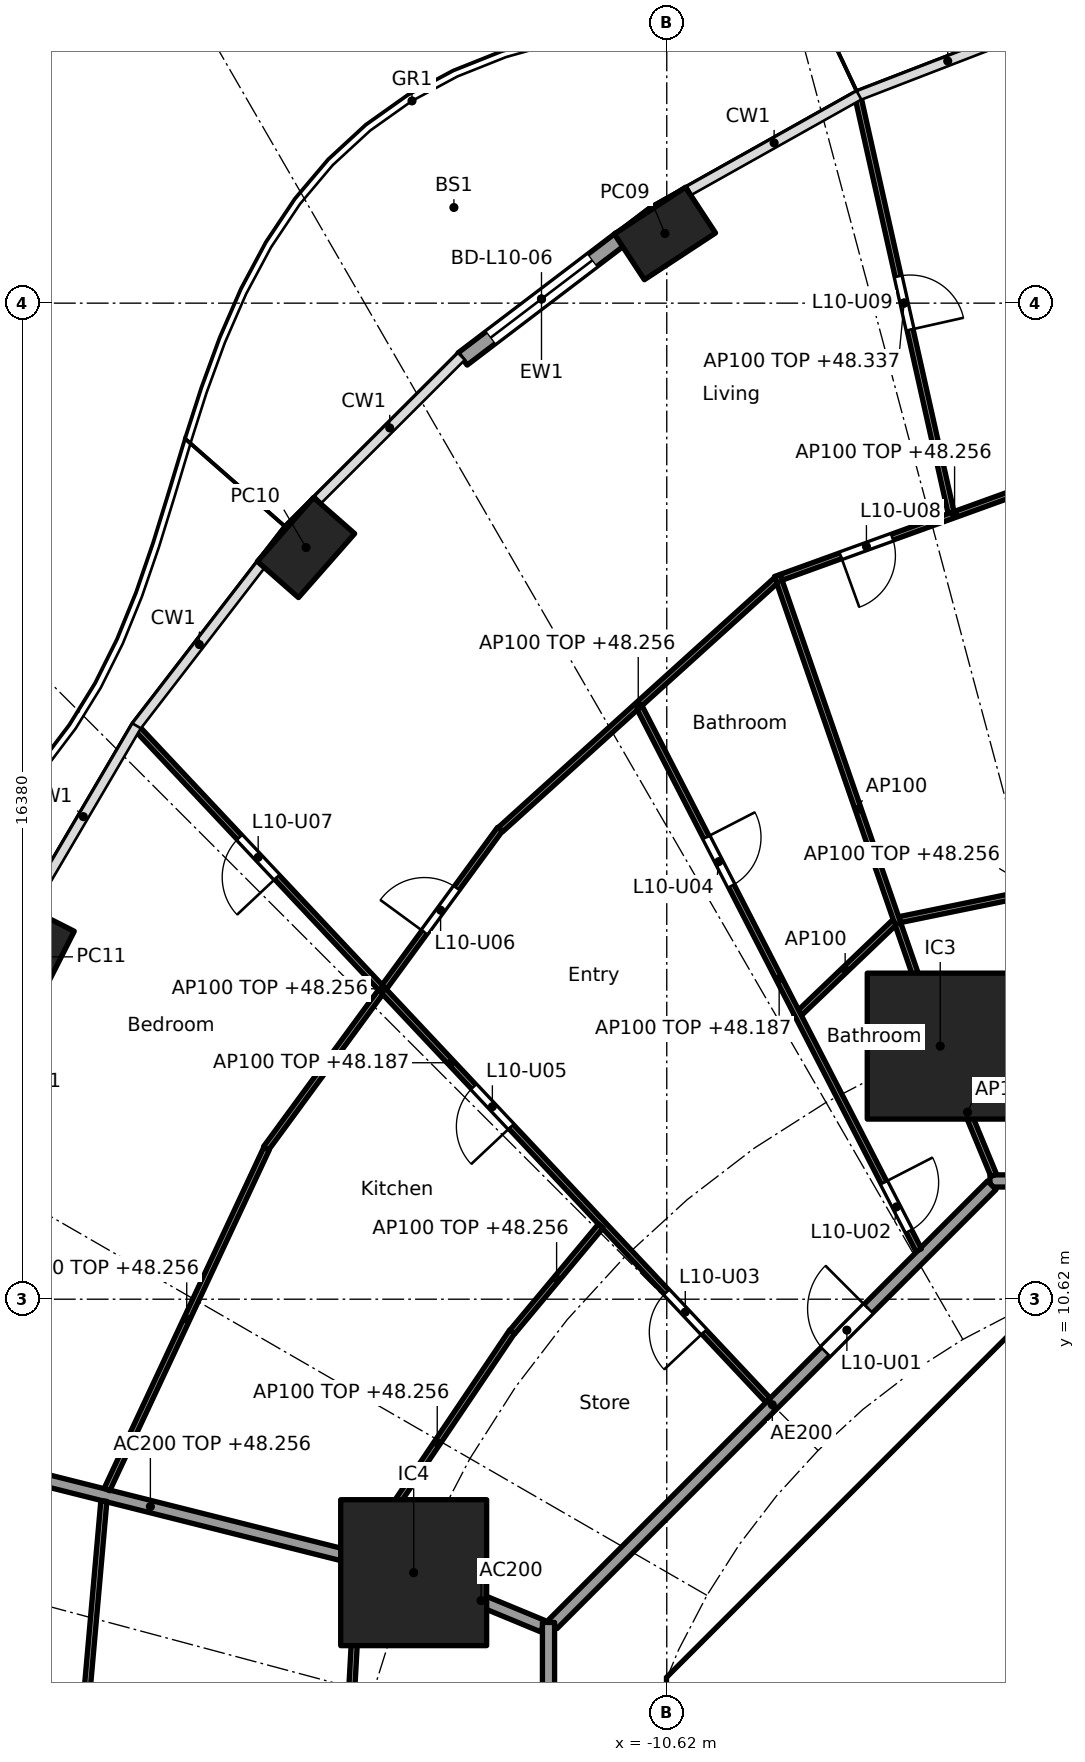
"""IFC4 building model, lengths in metres.
Left out: names, types, materials, properties, quantities, classifications, styles, units other than length and angle.
Written with IfcOpenShell. Run it as: python <this file> out.ifc"""

import sys

from ifc_helpers import new_model, si_unit, direction, frame, frame_2d, origin, origin_2d, place, context, subcontext, project, spatial, polyline, rectangle, hollow_rectangle, outline, extrude, element, fill, save


model = new_model("IFC4")
c1 = context("Model", 3, precision=1e-05, world=origin(), true_north=direction((0.0, 1.0)))
c2 = subcontext(c1, "Body", "Model", "MODEL_VIEW")
j1 = project(units=[si_unit("LENGTHUNIT", "METRE"), si_unit("PLANEANGLEUNIT", "RADIAN")], contexts=[c1])
p1 = place(None, origin())
s1 = spatial("IfcSite", under=j1, at=p1, CompositionType="ELEMENT")
p2 = place(p1, origin())
s2 = spatial("IfcBuilding", under=s1, at=p2, CompositionType="ELEMENT")
p3 = place(p2, frame((0.0, 0.0, 45.5)))
s3 = spatial("IfcBuildingStorey", under=s2, at=p3, CompositionType="ELEMENT", Elevation=45.5)
for number, where, z_axis, x_axis in (
    (1, (-10.65, 28.146, 0.0), (0.0, 0.0, 1.0), (-0.836, -0.549, 0.0)),
    (2, (-16.552, 22.981, 0.0), (0.0, 0.0, 1.0), (-0.66, -0.751, 0.0)),
    (3, (-21.082, 16.25, 0.0), (0.0, 0.0, 1.0), (-0.452, -0.892, 0.0)),
):
    element("IfcColumn", number, at=place(p3, frame(where, z_axis=z_axis, x_axis=x_axis)), inside=s3, PredefinedType="COLUMN", context=c2, shape_type="SweptSolid", body=[
        extrude(hollow_rectangle(XDim=1.4, YDim=0.9, WallThickness=0.05, at=origin_2d()), origin(), (0.0, 0.0, 1.0), 3.7),
    ])
for number, where, z_axis, x_axis in (
    (4, (-6.123, 14.782, 0.0), (0.0, 0.0, 1.0), (1.0, 0.0, 0.0)),
    (5, (-14.782, 6.123, 0.0), (0.0, 0.0, 1.0), (1.0, 0.0, 0.0)),
):
    element("IfcColumn", number, at=place(p3, frame(where, z_axis=z_axis, x_axis=x_axis)), inside=s3, PredefinedType="COLUMN", context=c2, shape_type="SweptSolid", body=[
        extrude(rectangle(XDim=2.4, YDim=2.4, at=origin_2d()), origin(), (0.0, 0.0, 1.0), 3.7),
    ])
p4 = place(p3, frame((-13.979, 26.081, 0.0), z_axis=(0.0, 0.0, 1.0), x_axis=(0.796022293214, 0.605267303517, 0.0)))
e6 = element("IfcWall", 6, at=p4, inside=s3, PredefinedType="SOLIDWALL", context=c2, shape_type="SweptSolid", body=[
    extrude(rectangle(XDim=3.262, YDim=0.25, at=frame_2d((1.631, 0.0))), origin(), (0.0, 0.0, 1.0), 3.44),
])
p5 = place(p4, frame((0.581, 0.0, 0.0)))
e7 = element("IfcOpeningElement", 7, at=p5, cuts=e6, PredefinedType="OPENING", context=c2, shape_type="SweptSolid", body=[
    extrude(rectangle(XDim=2.1, YDim=2.4, at=frame_2d((1.05, 1.2))), frame((0.0, 0.135, 0.0), z_axis=(0.0, -1.0, 0.0), x_axis=(1.0, 0.0, 0.0)), (0.0, 0.0, 1.0), 0.27),
])
p6 = place(p3, frame((-4.613, 9.988, 0.0), z_axis=(0.0, 0.0, 1.0), x_axis=(-0.707106781187, -0.707106781187, 0.0)))
e8 = element("IfcWall", 8, at=p6, inside=s3, PredefinedType="SHEAR", context=c2, shape_type="SweptSolid", body=[
    extrude(rectangle(XDim=7.602, YDim=0.6, at=frame_2d((3.801, 0.0))), origin(), (0.0, 0.0, 1.0), 3.44),
])
p7 = place(p6, frame((0.351, 0.0, 0.0)))
e9 = element("IfcOpeningElement", 9, at=p7, cuts=e8, PredefinedType="OPENING", context=c2, shape_type="SweptSolid", body=[
    extrude(rectangle(XDim=1.1, YDim=2.1, at=frame_2d((0.55, 1.05))), frame((0.0, 0.31, 0.0), z_axis=(0.0, -1.0, 0.0), x_axis=(1.0, 0.0, 0.0)), (0.0, 0.0, 1.0), 0.62),
])
p8 = place(p3, frame((-5.8, 4.3, 0.0), z_axis=(0.0, 0.0, 1.0), x_axis=(0.0, 1.0, 0.0)))
e10 = element("IfcWall", 10, at=p8, inside=s3, PredefinedType="PARTITIONING", context=c2, shape_type="SweptSolid", body=[
    extrude(rectangle(XDim=3.927, YDim=0.15, at=frame_2d((1.963, 0.0))), origin(), (0.0, 0.0, 1.0), 3.44),
])
p9 = place(p8, frame((1.551, 0.0, 0.0)))
e11 = element("IfcOpeningElement", 11, at=p9, cuts=e10, PredefinedType="OPENING", context=c2, shape_type="SweptSolid", body=[
    extrude(rectangle(XDim=0.9, YDim=2.1, at=frame_2d((0.45, 1.05))), frame((0.0, 0.085, 0.0), z_axis=(0.0, -1.0, 0.0), x_axis=(1.0, 0.0, 0.0)), (0.0, 0.0, 1.0), 0.17),
])
p10 = place(p3, origin())
e12 = element("IfcWall", 12, at=p10, inside=s3, PredefinedType="SHEAR", context=c2, shape_type="SweptSolid", body=[
    extrude(outline(polyline([(-10.2, 4.825), (-9.776, 4.401), (-10.025, 4.152), (-10.025, 3.801), (-10.625, 3.801), (-10.625, 4.401), (-10.2, 4.825)])), origin(), (0.0, 0.0, 1.0), 3.44),
])
p11 = place(p3, frame((-12.657, 5.243, 0.0), z_axis=(0.0, 0.0, 1.0), x_axis=(-0.923885664896, 0.382668627144, 0.0)))
e13 = element("IfcWall", 13, at=p11, inside=s3, PredefinedType="PARTITIONING", context=c2, shape_type="SweptSolid", body=[
    extrude(rectangle(XDim=2.2, YDim=0.2, at=frame_2d((1.1, 0.0))), origin(), (0.0, 0.0, 1.0), 3.44),
])
p12 = place(p3, frame((-14.831, 6.135, 0.0), z_axis=(0.0, 0.0, 1.0), x_axis=(-0.969884949569, 0.243563512454, 0.0)))
e14 = element("IfcWall", 14, at=p12, inside=s3, PredefinedType="PARTITIONING", context=c2, shape_type="SweptSolid", body=[
    extrude(rectangle(XDim=8.829, YDim=0.2, at=frame_2d((4.415, 0.0))), origin(), (0.0, 0.0, 1.0), 2.756),
])
p13 = place(p3, frame((5.104, 12.565, 0.0), z_axis=(0.0, 0.0, 1.0), x_axis=(-1.0, 0.0, 0.0)))
e15 = element("IfcWall", 15, at=p13, inside=s3, PredefinedType="PARTITIONING", context=c2, shape_type="SweptSolid", body=[
    extrude(rectangle(XDim=10.409, YDim=0.2, at=frame_2d((5.205, 0.0))), origin(), (0.0, 0.0, 1.0), 3.44),
])
p14 = place(p3, frame((-5.275, 12.494, 0.0), z_axis=(0.0, 0.0, 1.0), x_axis=(-0.707106781187, -0.707106781187, 0.0)))
e16 = element("IfcWall", 16, at=p14, inside=s3, PredefinedType="PARTITIONING", context=c2, shape_type="SweptSolid", body=[
    extrude(rectangle(XDim=10.209, YDim=0.2, at=frame_2d((5.104, 0.0))), origin(), (0.0, 0.0, 1.0), 3.44),
])
p15 = place(p14, frame((2.87, 0.0, 0.0)))
e17 = element("IfcOpeningElement", 17, at=p15, cuts=e16, PredefinedType="OPENING", context=c2, shape_type="SweptSolid", body=[
    extrude(rectangle(XDim=1.0, YDim=2.1, at=frame_2d((0.5, 1.05))), frame((0.0, 0.11, 0.0), z_axis=(0.0, -1.0, 0.0), x_axis=(1.0, 0.0, 0.0)), (0.0, 0.0, 1.0), 0.22),
])
p16 = place(p3, frame((-12.565, 5.304, 0.0), z_axis=(0.0, 0.0, 1.0), x_axis=(0.0, -1.0, 0.0)))
e18 = element("IfcWall", 18, at=p16, inside=s3, PredefinedType="PARTITIONING", context=c2, shape_type="SweptSolid", body=[
    extrude(rectangle(XDim=10.409, YDim=0.2, at=frame_2d((5.205, 0.0))), origin(), (0.0, 0.0, 1.0), 3.44),
])
p17 = place(p3, frame((-2.272, 17.789, 0.0), z_axis=(0.0, 0.0, 1.0), x_axis=(-0.979587203416, -0.2010196779, 0.0)))
e19 = element("IfcWall", 19, at=p17, inside=s3, PredefinedType="PARTITIONING", context=c2, shape_type="SweptSolid", body=[
    extrude(rectangle(XDim=4.613, YDim=0.1, at=frame_2d((2.306, 0.0))), origin(), (0.0, 0.0, 1.0), 2.756),
])
p18 = place(p17, frame((1.881, 0.0, 0.0)))
e20 = element("IfcOpeningElement", 20, at=p18, cuts=e19, PredefinedType="OPENING", context=c2, shape_type="SweptSolid", body=[
    extrude(rectangle(XDim=0.9, YDim=2.1, at=frame_2d((0.45, 1.05))), frame((0.0, 0.06, 0.0), z_axis=(0.0, -1.0, 0.0), x_axis=(1.0, 0.0, 0.0)), (0.0, 0.0, 1.0), 0.12),
])
p19 = place(p3, frame((-3.034, 24.554, 0.0), z_axis=(0.0, 0.0, 1.0), x_axis=(-0.940401691072, -0.340065669288, 0.0)))
e21 = element("IfcWall", 21, at=p19, inside=s3, PredefinedType="PARTITIONING", context=c2, shape_type="SweptSolid", body=[
    extrude(rectangle(XDim=6.067, YDim=0.1, at=frame_2d((3.034, 0.0))), origin(), (0.0, 0.0, 1.0), 2.756),
])
p20 = place(p19, frame((4.125, 0.0, 0.0)))
e22 = element("IfcOpeningElement", 22, at=p20, cuts=e21, PredefinedType="OPENING", context=c2, shape_type="SweptSolid", body=[
    extrude(rectangle(XDim=0.9, YDim=2.1, at=frame_2d((0.45, 1.05))), frame((0.0, 0.06, 0.0), z_axis=(0.0, -1.0, 0.0), x_axis=(1.0, 0.0, 0.0)), (0.0, 0.0, 1.0), 0.12),
])
p21 = place(p3, frame((-5.945, 23.555, 0.0), z_axis=(0.0, 0.0, 1.0), x_axis=(-0.218598565433, 0.975814873421, 0.0)))
e23 = element("IfcWall", 23, at=p21, inside=s3, PredefinedType="PARTITIONING", context=c2, shape_type="SweptSolid", body=[
    extrude(rectangle(XDim=7.065, YDim=0.1, at=frame_2d((3.533, 0.0))), origin(), (0.0, 0.0, 1.0), 2.837),
])
p22 = place(p21, frame((3.083, 0.0, 0.0)))
e24 = element("IfcOpeningElement", 24, at=p22, cuts=e23, PredefinedType="OPENING", context=c2, shape_type="SweptSolid", body=[
    extrude(rectangle(XDim=0.9, YDim=2.1, at=frame_2d((0.45, 1.05))), frame((0.0, 0.06, 0.0), z_axis=(0.0, -1.0, 0.0), x_axis=(1.0, 0.0, 0.0)), (0.0, 0.0, 1.0), 0.12),
])
p23 = place(p3, frame((-5.243, 12.657, 0.0), z_axis=(0.0, 0.0, 1.0), x_axis=(-0.382719158442, 0.923864733477, 0.0)))
e25 = element("IfcWall", 25, at=p23, inside=s3, PredefinedType="PARTITIONING", context=c2, shape_type="SweptSolid", body=[
    extrude(rectangle(XDim=2.25, YDim=0.1, at=frame_2d((1.125, 0.0))), origin(), (0.0, 0.0, 1.0), 3.44),
])
p24 = place(p3, frame((-6.139, 14.829, 0.0), z_axis=(0.0, 0.0, 1.0), x_axis=(-0.327183700812, 0.944960753642, 0.0)))
e26 = element("IfcWall", 26, at=p24, inside=s3, PredefinedType="PARTITIONING", context=c2, shape_type="SweptSolid", body=[
    extrude(rectangle(XDim=8.14, YDim=0.1, at=frame_2d((4.07, 0.0))), origin(), (0.0, 0.0, 1.0), 3.44),
])
p25 = place(p3, frame((-6.876, 16.817, 0.0), z_axis=(0.0, 0.0, 1.0), x_axis=(-0.722762371977, -0.691096631199, 0.0)))
e27 = element("IfcWall", 27, at=p25, inside=s3, PredefinedType="PARTITIONING", context=c2, shape_type="SweptSolid", body=[
    extrude(rectangle(XDim=2.244, YDim=0.1, at=frame_2d((1.122, 0.0))), origin(), (0.0, 0.0, 1.0), 3.44),
])
p26 = place(p3, frame((-8.823, 22.441, 0.0), z_axis=(0.0, 0.0, 1.0), x_axis=(-0.741722263338, -0.670707152242, 0.0)))
e28 = element("IfcWall", 28, at=p26, inside=s3, PredefinedType="PARTITIONING", context=c2, shape_type="SweptSolid", body=[
    extrude(rectangle(XDim=6.109, YDim=0.1, at=frame_2d((3.055, 0.0))), origin(), (0.0, 0.0, 1.0), 2.756),
])
p27 = place(p3, frame((-6.477, 11.427, 0.0), z_axis=(0.0, 0.0, 1.0), x_axis=(-0.457464037982, 0.889228122561, 0.0)))
e29 = element("IfcWall", 29, at=p27, inside=s3, PredefinedType="PARTITIONING", context=c2, shape_type="SweptSolid", body=[
    extrude(rectangle(XDim=10.032, YDim=0.1, at=frame_2d((5.016, 0.0))), origin(), (0.0, 0.0, 1.0), 2.687),
])
p28 = place(p27, frame((0.35, 0.0, 0.0)))
e30 = element("IfcOpeningElement", 30, at=p28, cuts=e29, PredefinedType="OPENING", context=c2, shape_type="SweptSolid", body=[
    extrude(rectangle(XDim=0.9, YDim=2.1, at=frame_2d((0.45, 1.05))), frame((0.0, 0.06, 0.0), z_axis=(0.0, -1.0, 0.0), x_axis=(1.0, 0.0, 0.0)), (0.0, 0.0, 1.0), 0.12),
])
p29 = place(p27, frame((6.735, 0.0, 0.0)))
e31 = element("IfcOpeningElement", 31, at=p29, cuts=e29, PredefinedType="OPENING", context=c2, shape_type="SweptSolid", body=[
    extrude(rectangle(XDim=0.9, YDim=2.1, at=frame_2d((0.45, 1.05))), frame((0.0, 0.06, 0.0), z_axis=(0.0, -1.0, 0.0), x_axis=(1.0, 0.0, 0.0)), (0.0, 0.0, 1.0), 0.12),
])
p30 = place(p3, frame((-13.362, 18.35, 0.0), z_axis=(0.0, 0.0, 1.0), x_axis=(-0.591191311491, -0.806531359104, 0.0)))
e32 = element("IfcWall", 32, at=p30, inside=s3, PredefinedType="PARTITIONING", context=c2, shape_type="SweptSolid", body=[
    extrude(rectangle(XDim=6.51, YDim=0.1, at=frame_2d((3.255, 0.0))), origin(), (0.0, 0.0, 1.0), 2.756),
])
p31 = place(p30, frame((1.202, 0.0, 0.0)))
e33 = element("IfcOpeningElement", 33, at=p31, cuts=e32, PredefinedType="OPENING", context=c2, shape_type="SweptSolid", body=[
    extrude(rectangle(XDim=0.9, YDim=2.1, at=frame_2d((0.45, 1.05))), frame((0.0, 0.06, 0.0), z_axis=(0.0, -1.0, 0.0), x_axis=(1.0, 0.0, 0.0)), (0.0, 0.0, 1.0), 0.12),
])
p32 = place(p3, frame((-8.953, 8.958, 0.0), z_axis=(0.0, 0.0, 1.0), x_axis=(-0.684574307023, 0.728943082939, 0.0)))
e34 = element("IfcWall", 34, at=p32, inside=s3, PredefinedType="PARTITIONING", context=c2, shape_type="SweptSolid", body=[
    extrude(rectangle(XDim=15.231, YDim=0.1, at=frame_2d((7.615, 0.0))), origin(), (0.0, 0.0, 1.0), 2.687),
])
p33 = place(p32, frame((1.54, 0.0, 0.0)))
e35 = element("IfcOpeningElement", 35, at=p33, cuts=e34, PredefinedType="OPENING", context=c2, shape_type="SweptSolid", body=[
    extrude(rectangle(XDim=0.9, YDim=2.1, at=frame_2d((0.45, 1.05))), frame((0.0, 0.06, 0.0), z_axis=(0.0, -1.0, 0.0), x_axis=(1.0, 0.0, 0.0)), (0.0, 0.0, 1.0), 0.12),
])
p34 = place(p32, frame((6.174, 0.0, 0.0)))
e36 = element("IfcOpeningElement", 36, at=p34, cuts=e34, PredefinedType="OPENING", context=c2, shape_type="SweptSolid", body=[
    extrude(rectangle(XDim=0.9, YDim=2.1, at=frame_2d((0.45, 1.05))), frame((0.0, 0.06, 0.0), z_axis=(0.0, -1.0, 0.0), x_axis=(1.0, 0.0, 0.0)), (0.0, 0.0, 1.0), 0.12),
])
p35 = place(p32, frame((11.8, 0.0, 0.0)))
e37 = element("IfcOpeningElement", 37, at=p35, cuts=e34, PredefinedType="OPENING", context=c2, shape_type="SweptSolid", body=[
    extrude(rectangle(XDim=0.9, YDim=2.1, at=frame_2d((0.45, 1.05))), frame((0.0, 0.06, 0.0), z_axis=(0.0, -1.0, 0.0), x_axis=(1.0, 0.0, 0.0)), (0.0, 0.0, 1.0), 0.12),
])
p36 = place(p3, frame((-11.705, 11.825, 0.0), z_axis=(0.0, 0.0, 1.0), x_axis=(-0.640861724905, -0.767656335577, 0.0)))
e38 = element("IfcWall", 38, at=p36, inside=s3, PredefinedType="PARTITIONING", context=c2, shape_type="SweptSolid", body=[
    extrude(rectangle(XDim=2.268, YDim=0.1, at=frame_2d((1.134, 0.0))), origin(), (0.0, 0.0, 1.0), 2.756),
])
p37 = place(p3, frame((-13.162, 10.087, 0.0), z_axis=(0.0, 0.0, 1.0), x_axis=(-0.55912750241, -0.829081682375, 0.0)))
e39 = element("IfcWall", 39, at=p37, inside=s3, PredefinedType="PARTITIONING", context=c2, shape_type="SweptSolid", body=[
    extrude(rectangle(XDim=4.408, YDim=0.1, at=frame_2d((2.204, 0.0))), origin(), (0.0, 0.0, 1.0), 2.756),
])
p38 = place(p3, frame((-17.203, 13.095, 0.0), z_axis=(0.0, 0.0, 1.0), x_axis=(-0.423926333401, -0.905696673202, 0.0)))
e40 = element("IfcWall", 40, at=p38, inside=s3, PredefinedType="PARTITIONING", context=c2, shape_type="SweptSolid", body=[
    extrude(rectangle(XDim=6.188, YDim=0.1, at=frame_2d((3.094, 0.0))), origin(), (0.0, 0.0, 1.0), 2.756),
])
p39 = place(p3, frame((-15.688, 6.249, 0.0), z_axis=(0.0, 0.0, 1.0), x_axis=(-0.054659814056, -0.998505034903, 0.0)))
e41 = element("IfcWall", 41, at=p39, inside=s3, PredefinedType="PARTITIONING", context=c2, shape_type="SweptSolid", body=[
    extrude(rectangle(XDim=6.208, YDim=0.1, at=frame_2d((3.104, 0.0))), origin(), (0.0, 0.0, 1.0), 2.756),
])
p40 = place(p3, frame((-19.877, 7.301, 0.0), z_axis=(0.0, 0.0, 1.0), x_axis=(-0.088143415068, -0.996107794558, 0.0)))
e42 = element("IfcWall", 42, at=p40, inside=s3, PredefinedType="PARTITIONING", context=c2, shape_type="SweptSolid", body=[
    extrude(rectangle(XDim=7.279, YDim=0.1, at=frame_2d((3.64, 0.0))), origin(), (0.0, 0.0, 1.0), 2.756),
])
p41 = place(p5, origin())
e43 = element("IfcDoor", 43, at=p41, inside=s3, OperationType="SLIDING_TO_LEFT", PredefinedType="DOOR", context=c2, shape_type="SweptSolid", body=[
    extrude(rectangle(XDim=2.1, YDim=2.4, at=frame_2d((1.05, 1.2))), frame((0.0, 0.025, 0.0), z_axis=(0.0, -1.0, 0.0), x_axis=(1.0, 0.0, 0.0)), (0.0, 0.0, 1.0), 0.05),
])
fill(e7, e43)
p42 = place(p9, origin())
e44 = element("IfcDoor", 44, at=p42, inside=s3, OperationType="SINGLE_SWING_RIGHT", PredefinedType="DOOR", context=c2, shape_type="SweptSolid", body=[
    extrude(rectangle(XDim=0.9, YDim=2.1, at=frame_2d((0.45, 1.05))), frame((0.0, 0.025, 0.0), z_axis=(0.0, -1.0, 0.0), x_axis=(1.0, 0.0, 0.0)), (0.0, 0.0, 1.0), 0.05),
])
fill(e11, e44)
p43 = place(p7, origin())
e45 = element("IfcDoor", 45, at=p43, inside=s3, OperationType="SINGLE_SWING_RIGHT", PredefinedType="DOOR", context=c2, shape_type="SweptSolid", body=[
    extrude(rectangle(XDim=1.1, YDim=2.1, at=frame_2d((0.55, 1.05))), frame((0.0, 0.025, 0.0), z_axis=(0.0, -1.0, 0.0), x_axis=(1.0, 0.0, 0.0)), (0.0, 0.0, 1.0), 0.05),
])
fill(e9, e45)
p44 = place(p15, frame((1.0, 0.0, 0.0), x_axis=(-1.0, 0.0, 0.0)))
e46 = element("IfcDoor", 46, at=p44, inside=s3, OperationType="SINGLE_SWING_RIGHT", PredefinedType="DOOR", context=c2, shape_type="SweptSolid", body=[
    extrude(rectangle(XDim=1.0, YDim=2.1, at=frame_2d((0.5, 1.05))), frame((0.0, 0.025, 0.0), z_axis=(0.0, -1.0, 0.0), x_axis=(1.0, 0.0, 0.0)), (0.0, 0.0, 1.0), 0.05),
])
fill(e17, e46)
p45 = place(p28, frame((0.9, 0.0, 0.0), x_axis=(-1.0, 0.0, 0.0)))
e47 = element("IfcDoor", 47, at=p45, inside=s3, OperationType="SINGLE_SWING_LEFT", PredefinedType="DOOR", context=c2, shape_type="SweptSolid", body=[
    extrude(rectangle(XDim=0.9, YDim=2.1, at=frame_2d((0.45, 1.05))), frame((0.0, 0.025, 0.0), z_axis=(0.0, -1.0, 0.0), x_axis=(1.0, 0.0, 0.0)), (0.0, 0.0, 1.0), 0.05),
])
fill(e30, e47)
p46 = place(p33, origin())
e48 = element("IfcDoor", 48, at=p46, inside=s3, OperationType="SINGLE_SWING_LEFT", PredefinedType="DOOR", context=c2, shape_type="SweptSolid", body=[
    extrude(rectangle(XDim=0.9, YDim=2.1, at=frame_2d((0.45, 1.05))), frame((0.0, 0.025, 0.0), z_axis=(0.0, -1.0, 0.0), x_axis=(1.0, 0.0, 0.0)), (0.0, 0.0, 1.0), 0.05),
])
fill(e35, e48)
p47 = place(p29, frame((0.9, 0.0, 0.0), x_axis=(-1.0, 0.0, 0.0)))
e49 = element("IfcDoor", 49, at=p47, inside=s3, OperationType="SINGLE_SWING_LEFT", PredefinedType="DOOR", context=c2, shape_type="SweptSolid", body=[
    extrude(rectangle(XDim=0.9, YDim=2.1, at=frame_2d((0.45, 1.05))), frame((0.0, 0.025, 0.0), z_axis=(0.0, -1.0, 0.0), x_axis=(1.0, 0.0, 0.0)), (0.0, 0.0, 1.0), 0.05),
])
fill(e31, e49)
p48 = place(p34, origin())
e50 = element("IfcDoor", 50, at=p48, inside=s3, OperationType="SINGLE_SWING_LEFT", PredefinedType="DOOR", context=c2, shape_type="SweptSolid", body=[
    extrude(rectangle(XDim=0.9, YDim=2.1, at=frame_2d((0.45, 1.05))), frame((0.0, 0.025, 0.0), z_axis=(0.0, -1.0, 0.0), x_axis=(1.0, 0.0, 0.0)), (0.0, 0.0, 1.0), 0.05),
])
fill(e36, e50)
p49 = place(p31, frame((0.9, 0.0, 0.0), x_axis=(-1.0, 0.0, 0.0)))
e51 = element("IfcDoor", 51, at=p49, inside=s3, OperationType="SINGLE_SWING_LEFT", PredefinedType="DOOR", context=c2, shape_type="SweptSolid", body=[
    extrude(rectangle(XDim=0.9, YDim=2.1, at=frame_2d((0.45, 1.05))), frame((0.0, 0.025, 0.0), z_axis=(0.0, -1.0, 0.0), x_axis=(1.0, 0.0, 0.0)), (0.0, 0.0, 1.0), 0.05),
])
fill(e33, e51)
p50 = place(p35, origin())
e52 = element("IfcDoor", 52, at=p50, inside=s3, OperationType="SINGLE_SWING_LEFT", PredefinedType="DOOR", context=c2, shape_type="SweptSolid", body=[
    extrude(rectangle(XDim=0.9, YDim=2.1, at=frame_2d((0.45, 1.05))), frame((0.0, 0.025, 0.0), z_axis=(0.0, -1.0, 0.0), x_axis=(1.0, 0.0, 0.0)), (0.0, 0.0, 1.0), 0.05),
])
fill(e37, e52)
p51 = place(p20, origin())
e53 = element("IfcDoor", 53, at=p51, inside=s3, OperationType="SINGLE_SWING_RIGHT", PredefinedType="DOOR", context=c2, shape_type="SweptSolid", body=[
    extrude(rectangle(XDim=0.9, YDim=2.1, at=frame_2d((0.45, 1.05))), frame((0.0, 0.025, 0.0), z_axis=(0.0, -1.0, 0.0), x_axis=(1.0, 0.0, 0.0)), (0.0, 0.0, 1.0), 0.05),
])
fill(e22, e53)
p52 = place(p22, frame((0.9, 0.0, 0.0), x_axis=(-1.0, 0.0, 0.0)))
e54 = element("IfcDoor", 54, at=p52, inside=s3, OperationType="SINGLE_SWING_RIGHT", PredefinedType="DOOR", context=c2, shape_type="SweptSolid", body=[
    extrude(rectangle(XDim=0.9, YDim=2.1, at=frame_2d((0.45, 1.05))), frame((0.0, 0.025, 0.0), z_axis=(0.0, -1.0, 0.0), x_axis=(1.0, 0.0, 0.0)), (0.0, 0.0, 1.0), 0.05),
])
fill(e24, e54)
save(model, sys.argv[1])
